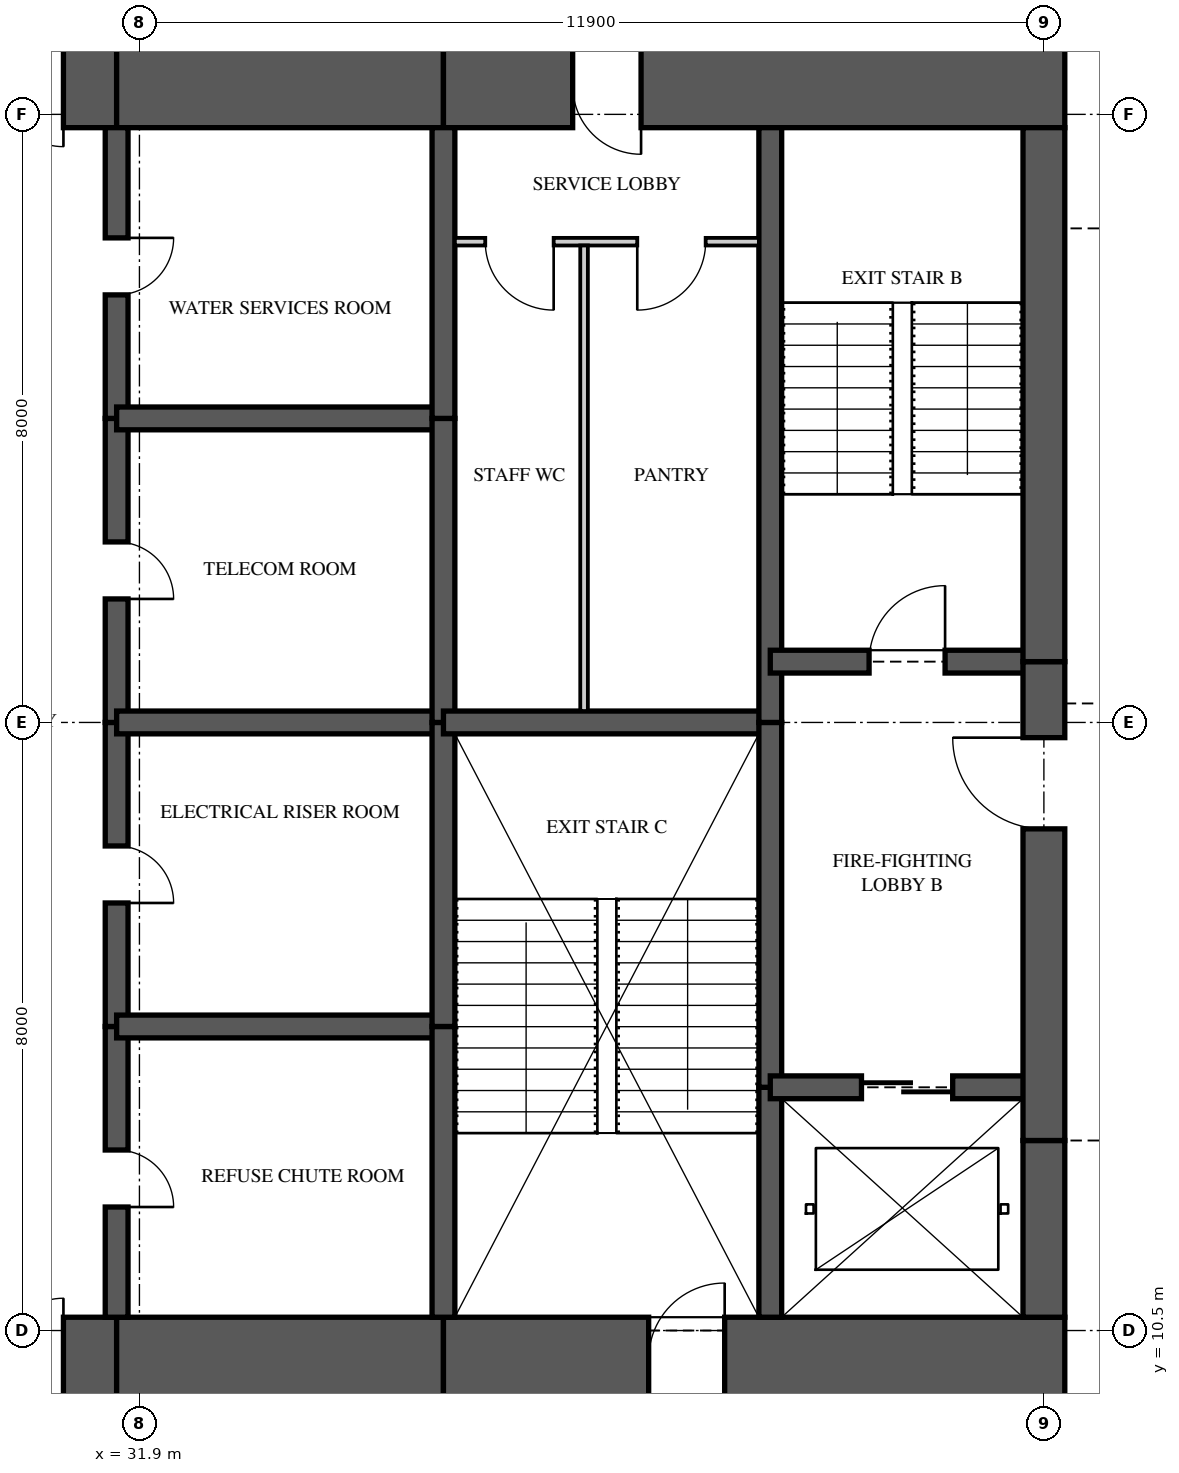
"""IFC4 building model, lengths in metres.
Left out: names, types, materials, properties, quantities, classifications, styles, units other than length and angle.
Written with IfcOpenShell. Run it as: python <this file> out.ifc"""

import sys

from ifc_helpers import new_model, si_unit, direction, frame, frame_2d, origin, place, context, subcontext, project, spatial, rectangle, extrude, element, fill, save


model = new_model("IFC4")
c1 = context("Model", 3, precision=1e-05, world=origin(), true_north=direction((0.0, 1.0)))
c2 = subcontext(c1, "Body", "Model", "MODEL_VIEW")
j1 = project(units=[si_unit("LENGTHUNIT", "METRE"), si_unit("PLANEANGLEUNIT", "RADIAN")], contexts=[c1])
p1 = place(None, origin())
s1 = spatial("IfcSite", under=j1, at=p1, CompositionType="ELEMENT")
p2 = place(p1, origin())
s2 = spatial("IfcBuilding", under=s1, at=p2, CompositionType="ELEMENT")
p3 = place(p2, frame((0.0, 0.0, 235.45)))
s3 = spatial("IfcBuildingStorey", under=s2, at=p3, CompositionType="ELEMENT", Elevation=235.45)
p4 = place(p3, frame((26.0, 10.125, 0.0), z_axis=(0.0, 0.0, 1.0), x_axis=(1.0, 0.0, 0.0)))
e1 = element("IfcWall", 1, at=p4, inside=s3, PredefinedType="SHEAR", context=c2, shape_type="SweptSolid", body=[
    extrude(rectangle(XDim=5.6, YDim=1.1, at=frame_2d((2.8, 0.0))), origin(), (0.0, 0.0, 1.0), 3.5),
])
p5 = place(p4, frame((3.3, 0.0, 0.0)))
e2 = element("IfcOpeningElement", 2, at=p5, cuts=e1, PredefinedType="OPENING", context=c2, shape_type="SweptSolid", body=[
    extrude(rectangle(XDim=1.6, YDim=2.1, at=frame_2d((0.8, 1.05))), frame((0.0, 0.56, 0.0), z_axis=(0.0, -1.0, 0.0), x_axis=(1.0, 0.0, 0.0)), (0.0, 0.0, 1.0), 1.12),
])
p6 = place(p3, frame((31.6, 10.125, 0.0), z_axis=(0.0, 0.0, 1.0), x_axis=(1.0, 0.0, 0.0)))
e3 = element("IfcWall", 3, at=p6, inside=s3, PredefinedType="SHEAR", context=c2, shape_type="SweptSolid", body=[
    extrude(rectangle(XDim=4.3, YDim=1.1, at=frame_2d((2.15, 0.0))), origin(), (0.0, 0.0, 1.0), 3.5),
])
p7 = place(p3, frame((35.9, 10.125, 0.0), z_axis=(0.0, 0.0, 1.0), x_axis=(1.0, 0.0, 0.0)))
e4 = element("IfcWall", 4, at=p7, inside=s3, PredefinedType="SHEAR", context=c2, shape_type="SweptSolid", body=[
    extrude(rectangle(XDim=8.175, YDim=1.1, at=frame_2d((4.087, 0.0))), origin(), (0.0, 0.0, 1.0), 3.5),
])
p8 = place(p7, frame((2.7, 0.0, 0.0)))
e5 = element("IfcOpeningElement", 5, at=p8, cuts=e4, PredefinedType="OPENING", context=c2, shape_type="SweptSolid", body=[
    extrude(rectangle(XDim=1.0, YDim=2.1, at=frame_2d((0.5, 1.05))), frame((0.0, 0.56, 0.0), z_axis=(0.0, -1.0, 0.0), x_axis=(1.0, 0.0, 0.0)), (0.0, 0.0, 1.0), 1.12),
])
p9 = place(p3, frame((44.075, 26.875, 0.0), z_axis=(0.0, 0.0, 1.0), x_axis=(-1.0, 0.0, 0.0)))
e6 = element("IfcWall", 6, at=p9, inside=s3, PredefinedType="SHEAR", context=c2, shape_type="SweptSolid", body=[
    extrude(rectangle(XDim=8.175, YDim=1.1, at=frame_2d((4.087, 0.0))), origin(), (0.0, 0.0, 1.0), 3.5),
])
p10 = place(p9, frame((5.575, 0.0, 0.0)))
e7 = element("IfcOpeningElement", 7, at=p10, cuts=e6, PredefinedType="OPENING", context=c2, shape_type="SweptSolid", body=[
    extrude(rectangle(XDim=0.9, YDim=2.1, at=frame_2d((0.45, 1.05))), frame((0.0, 0.56, 0.0), z_axis=(0.0, -1.0, 0.0), x_axis=(1.0, 0.0, 0.0)), (0.0, 0.0, 1.0), 1.12),
])
p11 = place(p3, frame((35.9, 26.875, 0.0), z_axis=(0.0, 0.0, 1.0), x_axis=(-1.0, 0.0, 0.0)))
e8 = element("IfcWall", 8, at=p11, inside=s3, PredefinedType="SHEAR", context=c2, shape_type="SweptSolid", body=[
    extrude(rectangle(XDim=4.3, YDim=1.1, at=frame_2d((2.15, 0.0))), origin(), (0.0, 0.0, 1.0), 3.5),
])
p12 = place(p3, frame((31.6, 26.875, 0.0), z_axis=(0.0, 0.0, 1.0), x_axis=(-1.0, 0.0, 0.0)))
e9 = element("IfcWall", 9, at=p12, inside=s3, PredefinedType="SHEAR", context=c2, shape_type="SweptSolid", body=[
    extrude(rectangle(XDim=5.6, YDim=1.1, at=frame_2d((2.8, 0.0))), origin(), (0.0, 0.0, 1.0), 3.5),
])
p13 = place(p12, frame((0.7, 0.0, 0.0)))
e10 = element("IfcOpeningElement", 10, at=p13, cuts=e9, PredefinedType="OPENING", context=c2, shape_type="SweptSolid", body=[
    extrude(rectangle(XDim=1.6, YDim=2.1, at=frame_2d((0.8, 1.05))), frame((0.0, 0.56, 0.0), z_axis=(0.0, -1.0, 0.0), x_axis=(1.0, 0.0, 0.0)), (0.0, 0.0, 1.0), 1.12),
])
p14 = place(p3, frame((43.8, 10.675, 0.0), z_axis=(0.0, 0.0, 1.0), x_axis=(0.0, 1.0, 0.0)))
e11 = element("IfcWall", 11, at=p14, inside=s3, PredefinedType="SHEAR", context=c2, shape_type="SweptSolid", body=[
    extrude(rectangle(XDim=2.325, YDim=0.55, at=frame_2d((1.163, 0.0))), origin(), (0.0, 0.0, 1.0), 3.5),
])
p15 = place(p3, frame((43.8, 13.0, 0.0), z_axis=(0.0, 0.0, 1.0), x_axis=(0.0, 1.0, 0.0)))
e12 = element("IfcWall", 12, at=p15, inside=s3, PredefinedType="SHEAR", context=c2, shape_type="SweptSolid", body=[
    extrude(rectangle(XDim=6.3, YDim=0.55, at=frame_2d((3.15, 0.0))), origin(), (0.0, 0.0, 1.0), 3.5),
])
p16 = place(p15, frame((4.1, 0.0, 0.0)))
e13 = element("IfcOpeningElement", 13, at=p16, cuts=e12, PredefinedType="OPENING", context=c2, shape_type="SweptSolid", body=[
    extrude(rectangle(XDim=1.2, YDim=2.2, at=frame_2d((0.6, 1.1))), frame((0.0, 0.285, 0.0), z_axis=(0.0, -1.0, 0.0), x_axis=(1.0, 0.0, 0.0)), (0.0, 0.0, 1.0), 0.57),
])
p17 = place(p3, frame((43.8, 19.3, 0.0), z_axis=(0.0, 0.0, 1.0), x_axis=(0.0, 1.0, 0.0)))
e14 = element("IfcWall", 14, at=p17, inside=s3, PredefinedType="SHEAR", context=c2, shape_type="SweptSolid", body=[
    extrude(rectangle(XDim=7.025, YDim=0.55, at=frame_2d((3.512, 0.0))), origin(), (0.0, 0.0, 1.0), 3.5),
])
p18 = place(p3, frame((31.6, 10.675, 0.0), z_axis=(0.0, 0.0, 1.0), x_axis=(0.0, 1.0, 0.0)))
e15 = element("IfcWall", 15, at=p18, inside=s3, PredefinedType="SHEAR", context=c2, shape_type="SweptSolid", body=[
    extrude(rectangle(XDim=3.825, YDim=0.3, at=frame_2d((1.913, 0.0))), origin(), (0.0, 0.0, 1.0), 3.5),
])
p19 = place(p18, frame((1.45, 0.0, 0.0)))
e16 = element("IfcOpeningElement", 16, at=p19, cuts=e15, PredefinedType="OPENING", context=c2, shape_type="SweptSolid", body=[
    extrude(rectangle(XDim=0.75, YDim=2.1, at=frame_2d((0.375, 1.05))), frame((0.0, 0.16, 0.0), z_axis=(0.0, -1.0, 0.0), x_axis=(1.0, 0.0, 0.0)), (0.0, 0.0, 1.0), 0.32),
])
p20 = place(p3, frame((31.6, 14.5, 0.0), z_axis=(0.0, 0.0, 1.0), x_axis=(0.0, 1.0, 0.0)))
e17 = element("IfcWall", 17, at=p20, inside=s3, PredefinedType="SHEAR", context=c2, shape_type="SweptSolid", body=[
    extrude(rectangle(XDim=4.0, YDim=0.3, at=frame_2d((2.0, 0.0))), origin(), (0.0, 0.0, 1.0), 3.5),
])
p21 = place(p20, frame((1.625, 0.0, 0.0)))
e18 = element("IfcOpeningElement", 18, at=p21, cuts=e17, PredefinedType="OPENING", context=c2, shape_type="SweptSolid", body=[
    extrude(rectangle(XDim=0.75, YDim=2.1, at=frame_2d((0.375, 1.05))), frame((0.0, 0.16, 0.0), z_axis=(0.0, -1.0, 0.0), x_axis=(1.0, 0.0, 0.0)), (0.0, 0.0, 1.0), 0.32),
])
p22 = place(p3, frame((31.6, 18.5, 0.0), z_axis=(0.0, 0.0, 1.0), x_axis=(0.0, 1.0, 0.0)))
e19 = element("IfcWall", 19, at=p22, inside=s3, PredefinedType="SHEAR", context=c2, shape_type="SweptSolid", body=[
    extrude(rectangle(XDim=4.0, YDim=0.3, at=frame_2d((2.0, 0.0))), origin(), (0.0, 0.0, 1.0), 3.5),
])
p23 = place(p22, frame((1.625, 0.0, 0.0)))
e20 = element("IfcOpeningElement", 20, at=p23, cuts=e19, PredefinedType="OPENING", context=c2, shape_type="SweptSolid", body=[
    extrude(rectangle(XDim=0.75, YDim=2.1, at=frame_2d((0.375, 1.05))), frame((0.0, 0.16, 0.0), z_axis=(0.0, -1.0, 0.0), x_axis=(1.0, 0.0, 0.0)), (0.0, 0.0, 1.0), 0.32),
])
p24 = place(p3, frame((31.6, 22.5, 0.0), z_axis=(0.0, 0.0, 1.0), x_axis=(0.0, 1.0, 0.0)))
e21 = element("IfcWall", 21, at=p24, inside=s3, PredefinedType="SHEAR", context=c2, shape_type="SweptSolid", body=[
    extrude(rectangle(XDim=3.825, YDim=0.3, at=frame_2d((1.913, 0.0))), origin(), (0.0, 0.0, 1.0), 3.5),
])
p25 = place(p24, frame((1.625, 0.0, 0.0)))
e22 = element("IfcOpeningElement", 22, at=p25, cuts=e21, PredefinedType="OPENING", context=c2, shape_type="SweptSolid", body=[
    extrude(rectangle(XDim=0.75, YDim=2.1, at=frame_2d((0.375, 1.05))), frame((0.0, 0.16, 0.0), z_axis=(0.0, -1.0, 0.0), x_axis=(1.0, 0.0, 0.0)), (0.0, 0.0, 1.0), 0.32),
])
p26 = place(p3, frame((35.9, 10.675, 0.0), z_axis=(0.0, 0.0, 1.0), x_axis=(0.0, 1.0, 0.0)))
e23 = element("IfcWall", 23, at=p26, inside=s3, PredefinedType="SHEAR", context=c2, shape_type="SweptSolid", body=[
    extrude(rectangle(XDim=3.825, YDim=0.3, at=frame_2d((1.913, 0.0))), origin(), (0.0, 0.0, 1.0), 3.5),
])
for number, where, z_axis, x_axis in (
    (24, (35.9, 14.5, 0.0), (0.0, 0.0, 1.0), (0.0, 1.0, 0.0)),
    (25, (35.9, 18.5, 0.0), (0.0, 0.0, 1.0), (0.0, 1.0, 0.0)),
):
    element("IfcWall", number, at=place(p3, frame(where, z_axis=z_axis, x_axis=x_axis)), inside=s3, PredefinedType="SHEAR", context=c2, shape_type="SweptSolid", body=[
        extrude(rectangle(XDim=4.0, YDim=0.3, at=frame_2d((2.0, 0.0))), origin(), (0.0, 0.0, 1.0), 3.5),
    ])
p27 = place(p3, frame((35.9, 22.5, 0.0), z_axis=(0.0, 0.0, 1.0), x_axis=(0.0, 1.0, 0.0)))
e26 = element("IfcWall", 26, at=p27, inside=s3, PredefinedType="SHEAR", context=c2, shape_type="SweptSolid", body=[
    extrude(rectangle(XDim=3.825, YDim=0.3, at=frame_2d((1.913, 0.0))), origin(), (0.0, 0.0, 1.0), 3.5),
])
p28 = place(p3, frame((40.2, 10.675, 0.0), z_axis=(0.0, 0.0, 1.0), x_axis=(0.0, 1.0, 0.0)))
e27 = element("IfcWall", 27, at=p28, inside=s3, PredefinedType="SHEAR", context=c2, shape_type="SweptSolid", body=[
    extrude(rectangle(XDim=3.025, YDim=0.3, at=frame_2d((1.512, 0.0))), origin(), (0.0, 0.0, 1.0), 3.5),
])
p29 = place(p3, frame((40.2, 13.7, 0.0), z_axis=(0.0, 0.0, 1.0), x_axis=(0.0, 1.0, 0.0)))
e28 = element("IfcWall", 28, at=p29, inside=s3, PredefinedType="SHEAR", context=c2, shape_type="SweptSolid", body=[
    extrude(rectangle(XDim=4.8, YDim=0.3, at=frame_2d((2.4, 0.0))), origin(), (0.0, 0.0, 1.0), 3.5),
])
p30 = place(p3, frame((40.2, 18.5, 0.0), z_axis=(0.0, 0.0, 1.0), x_axis=(0.0, 1.0, 0.0)))
e29 = element("IfcWall", 29, at=p30, inside=s3, PredefinedType="SHEAR", context=c2, shape_type="SweptSolid", body=[
    extrude(rectangle(XDim=7.825, YDim=0.3, at=frame_2d((3.913, 0.0))), origin(), (0.0, 0.0, 1.0), 3.5),
])
for number, where, z_axis, x_axis in (
    (30, (31.6, 14.5, 0.0), (0.0, 0.0, 1.0), (1.0, 0.0, 0.0)),
    (31, (31.6, 18.5, 0.0), (0.0, 0.0, 1.0), (1.0, 0.0, 0.0)),
    (32, (31.6, 22.5, 0.0), (0.0, 0.0, 1.0), (1.0, 0.0, 0.0)),
):
    element("IfcWall", number, at=place(p3, frame(where, z_axis=z_axis, x_axis=x_axis)), inside=s3, PredefinedType="SHEAR", context=c2, shape_type="SweptSolid", body=[
        extrude(rectangle(XDim=4.3, YDim=0.3, at=frame_2d((2.15, 0.0))), origin(), (0.0, 0.0, 1.0), 3.5),
    ])
p31 = place(p3, frame((35.9, 18.5, 0.0), z_axis=(0.0, 0.0, 1.0), x_axis=(1.0, 0.0, 0.0)))
e33 = element("IfcWall", 33, at=p31, inside=s3, PredefinedType="SHEAR", context=c2, shape_type="SweptSolid", body=[
    extrude(rectangle(XDim=4.3, YDim=0.3, at=frame_2d((2.15, 0.0))), origin(), (0.0, 0.0, 1.0), 3.5),
])
p32 = place(p3, frame((40.2, 13.7, 0.0), z_axis=(0.0, 0.0, 1.0), x_axis=(1.0, 0.0, 0.0)))
e34 = element("IfcWall", 34, at=p32, inside=s3, PredefinedType="SHEAR", context=c2, shape_type="SweptSolid", body=[
    extrude(rectangle(XDim=3.6, YDim=0.3, at=frame_2d((1.8, 0.0))), origin(), (0.0, 0.0, 1.0), 3.5),
])
p33 = place(p32, frame((1.2, 0.0, 0.0)))
e35 = element("IfcOpeningElement", 35, at=p33, cuts=e34, PredefinedType="OPENING", context=c2, shape_type="SweptSolid", body=[
    extrude(rectangle(XDim=1.2, YDim=2.1, at=frame_2d((0.6, 1.05))), frame((0.0, 0.16, 0.0), z_axis=(0.0, -1.0, 0.0), x_axis=(1.0, 0.0, 0.0)), (0.0, 0.0, 1.0), 0.32),
])
p34 = place(p3, frame((40.2, 19.3, 0.0), z_axis=(0.0, 0.0, 1.0), x_axis=(1.0, 0.0, 0.0)))
e36 = element("IfcWall", 36, at=p34, inside=s3, PredefinedType="SHEAR", context=c2, shape_type="SweptSolid", body=[
    extrude(rectangle(XDim=3.6, YDim=0.3, at=frame_2d((1.8, 0.0))), origin(), (0.0, 0.0, 1.0), 3.5),
])
p35 = place(p34, frame((1.3, 0.0, 0.0)))
e37 = element("IfcOpeningElement", 37, at=p35, cuts=e36, PredefinedType="OPENING", context=c2, shape_type="SweptSolid", body=[
    extrude(rectangle(XDim=1.0, YDim=2.1, at=frame_2d((0.5, 1.05))), frame((0.0, 0.16, 0.0), z_axis=(0.0, -1.0, 0.0), x_axis=(1.0, 0.0, 0.0)), (0.0, 0.0, 1.0), 0.32),
])
p36 = place(p3, frame((36.05, 24.825, 0.0), z_axis=(0.0, 0.0, 1.0), x_axis=(1.0, 0.0, 0.0)))
e38 = element("IfcWall", 38, at=p36, inside=s3, PredefinedType="PARTITIONING", context=c2, shape_type="SweptSolid", body=[
    extrude(rectangle(XDim=4.0, YDim=0.1, at=frame_2d((2.0, 0.0))), origin(), (0.0, 0.0, 1.0), 3.26),
])
p37 = place(p36, frame((0.4, 0.0, 0.0)))
e39 = element("IfcOpeningElement", 39, at=p37, cuts=e38, PredefinedType="OPENING", context=c2, shape_type="SweptSolid", body=[
    extrude(rectangle(XDim=0.9, YDim=2.1, at=frame_2d((0.45, 1.05))), frame((0.0, 0.06, 0.0), z_axis=(0.0, -1.0, 0.0), x_axis=(1.0, 0.0, 0.0)), (0.0, 0.0, 1.0), 0.12),
])
p38 = place(p36, frame((2.4, 0.0, 0.0)))
e40 = element("IfcOpeningElement", 40, at=p38, cuts=e38, PredefinedType="OPENING", context=c2, shape_type="SweptSolid", body=[
    extrude(rectangle(XDim=0.9, YDim=2.1, at=frame_2d((0.45, 1.05))), frame((0.0, 0.06, 0.0), z_axis=(0.0, -1.0, 0.0), x_axis=(1.0, 0.0, 0.0)), (0.0, 0.0, 1.0), 0.12),
])
p39 = place(p3, frame((37.75, 18.65, 0.0), z_axis=(0.0, 0.0, 1.0), x_axis=(0.0, 1.0, 0.0)))
e41 = element("IfcWall", 41, at=p39, inside=s3, PredefinedType="PARTITIONING", context=c2, shape_type="SweptSolid", body=[
    extrude(rectangle(XDim=6.125, YDim=0.1, at=frame_2d((3.062, 0.0))), origin(), (0.0, 0.0, 1.0), 3.26),
])
p40 = place(p37, frame((0.9, 0.0, 0.0), z_axis=(0.0, 0.0, 1.0), x_axis=(-1.0, 0.0, 0.0)))
e42 = element("IfcDoor", 42, at=p40, inside=s3, OperationType="SINGLE_SWING_LEFT", PredefinedType="DOOR", context=c2, shape_type="SweptSolid", body=[
    extrude(rectangle(XDim=0.9, YDim=2.1, at=frame_2d((0.45, 1.05))), frame((0.0, 0.025, 0.0), z_axis=(0.0, -1.0, 0.0), x_axis=(1.0, 0.0, 0.0)), (0.0, 0.0, 1.0), 0.05),
])
fill(e39, e42)
p41 = place(p38, frame((0.9, 0.0, 0.0), z_axis=(0.0, 0.0, 1.0), x_axis=(-1.0, 0.0, 0.0)))
e43 = element("IfcDoor", 43, at=p41, inside=s3, OperationType="SINGLE_SWING_RIGHT", PredefinedType="DOOR", context=c2, shape_type="SweptSolid", body=[
    extrude(rectangle(XDim=0.9, YDim=2.1, at=frame_2d((0.45, 1.05))), frame((0.0, 0.025, 0.0), z_axis=(0.0, -1.0, 0.0), x_axis=(1.0, 0.0, 0.0)), (0.0, 0.0, 1.0), 0.05),
])
fill(e40, e43)
p42 = place(p35, origin())
e44 = element("IfcDoor", 44, at=p42, inside=s3, OperationType="SINGLE_SWING_RIGHT", PredefinedType="DOOR", context=c2, shape_type="SweptSolid", body=[
    extrude(rectangle(XDim=1.0, YDim=2.1, at=frame_2d((0.5, 1.05))), frame((0.0, 0.025, 0.0), z_axis=(0.0, -1.0, 0.0), x_axis=(1.0, 0.0, 0.0)), (0.0, 0.0, 1.0), 0.05),
])
fill(e37, e44)
p43 = place(p16, origin())
e45 = element("IfcDoor", 45, at=p43, inside=s3, OperationType="SINGLE_SWING_RIGHT", PredefinedType="DOOR", context=c2, shape_type="SweptSolid", body=[
    extrude(rectangle(XDim=1.2, YDim=2.2, at=frame_2d((0.6, 1.1))), frame((0.0, 0.025, 0.0), z_axis=(0.0, -1.0, 0.0), x_axis=(1.0, 0.0, 0.0)), (0.0, 0.0, 1.0), 0.05),
])
fill(e13, e45)
p44 = place(p33, origin())
e46 = element("IfcDoor", 46, at=p44, inside=s3, OperationType="SLIDING_TO_LEFT", PredefinedType="DOOR", context=c2, shape_type="SweptSolid", body=[
    extrude(rectangle(XDim=1.2, YDim=2.1, at=frame_2d((0.6, 1.05))), frame((0.0, 0.025, 0.0), z_axis=(0.0, -1.0, 0.0), x_axis=(1.0, 0.0, 0.0)), (0.0, 0.0, 1.0), 0.05),
])
fill(e35, e46)
p45 = place(p5, origin())
e47 = element("IfcDoor", 47, at=p45, inside=s3, OperationType="DOUBLE_DOOR_SINGLE_SWING", PredefinedType="DOOR", context=c2, shape_type="SweptSolid", body=[
    extrude(rectangle(XDim=1.6, YDim=2.1, at=frame_2d((0.8, 1.05))), frame((0.0, 0.025, 0.0), z_axis=(0.0, -1.0, 0.0), x_axis=(1.0, 0.0, 0.0)), (0.0, 0.0, 1.0), 0.05),
])
fill(e2, e47)
p46 = place(p13, origin())
e48 = element("IfcDoor", 48, at=p46, inside=s3, OperationType="DOUBLE_DOOR_SINGLE_SWING", PredefinedType="DOOR", context=c2, shape_type="SweptSolid", body=[
    extrude(rectangle(XDim=1.6, YDim=2.1, at=frame_2d((0.8, 1.05))), frame((0.0, 0.025, 0.0), z_axis=(0.0, -1.0, 0.0), x_axis=(1.0, 0.0, 0.0)), (0.0, 0.0, 1.0), 0.05),
])
fill(e10, e48)
p47 = place(p19, frame((0.75, 0.0, 0.0), z_axis=(0.0, 0.0, 1.0), x_axis=(-1.0, 0.0, 0.0)))
e49 = element("IfcDoor", 49, at=p47, inside=s3, OperationType="SINGLE_SWING_RIGHT", PredefinedType="DOOR", context=c2, shape_type="SweptSolid", body=[
    extrude(rectangle(XDim=0.75, YDim=2.1, at=frame_2d((0.375, 1.05))), frame((0.0, 0.025, 0.0), z_axis=(0.0, -1.0, 0.0), x_axis=(1.0, 0.0, 0.0)), (0.0, 0.0, 1.0), 0.05),
])
fill(e16, e49)
p48 = place(p21, frame((0.75, 0.0, 0.0), z_axis=(0.0, 0.0, 1.0), x_axis=(-1.0, 0.0, 0.0)))
e50 = element("IfcDoor", 50, at=p48, inside=s3, OperationType="SINGLE_SWING_RIGHT", PredefinedType="DOOR", context=c2, shape_type="SweptSolid", body=[
    extrude(rectangle(XDim=0.75, YDim=2.1, at=frame_2d((0.375, 1.05))), frame((0.0, 0.025, 0.0), z_axis=(0.0, -1.0, 0.0), x_axis=(1.0, 0.0, 0.0)), (0.0, 0.0, 1.0), 0.05),
])
fill(e18, e50)
p49 = place(p23, frame((0.75, 0.0, 0.0), z_axis=(0.0, 0.0, 1.0), x_axis=(-1.0, 0.0, 0.0)))
e51 = element("IfcDoor", 51, at=p49, inside=s3, OperationType="SINGLE_SWING_RIGHT", PredefinedType="DOOR", context=c2, shape_type="SweptSolid", body=[
    extrude(rectangle(XDim=0.75, YDim=2.1, at=frame_2d((0.375, 1.05))), frame((0.0, 0.025, 0.0), z_axis=(0.0, -1.0, 0.0), x_axis=(1.0, 0.0, 0.0)), (0.0, 0.0, 1.0), 0.05),
])
fill(e20, e51)
p50 = place(p25, frame((0.75, 0.0, 0.0), z_axis=(0.0, 0.0, 1.0), x_axis=(-1.0, 0.0, 0.0)))
e52 = element("IfcDoor", 52, at=p50, inside=s3, OperationType="SINGLE_SWING_LEFT", PredefinedType="DOOR", context=c2, shape_type="SweptSolid", body=[
    extrude(rectangle(XDim=0.75, YDim=2.1, at=frame_2d((0.375, 1.05))), frame((0.0, 0.025, 0.0), z_axis=(0.0, -1.0, 0.0), x_axis=(1.0, 0.0, 0.0)), (0.0, 0.0, 1.0), 0.05),
])
fill(e22, e52)
p51 = place(p8, origin())
e53 = element("IfcDoor", 53, at=p51, inside=s3, OperationType="SINGLE_SWING_RIGHT", PredefinedType="DOOR", context=c2, shape_type="SweptSolid", body=[
    extrude(rectangle(XDim=1.0, YDim=2.1, at=frame_2d((0.5, 1.05))), frame((0.0, 0.025, 0.0), z_axis=(0.0, -1.0, 0.0), x_axis=(1.0, 0.0, 0.0)), (0.0, 0.0, 1.0), 0.05),
])
fill(e5, e53)
p52 = place(p10, origin())
e54 = element("IfcDoor", 54, at=p52, inside=s3, OperationType="SINGLE_SWING_LEFT", PredefinedType="DOOR", context=c2, shape_type="SweptSolid", body=[
    extrude(rectangle(XDim=0.9, YDim=2.1, at=frame_2d((0.45, 1.05))), frame((0.0, 0.47, 0.0), z_axis=(0.0, -1.0, 0.0), x_axis=(1.0, 0.0, 0.0)), (0.0, 0.0, 1.0), 0.8),
])
fill(e7, e54)
save(model, sys.argv[1])
